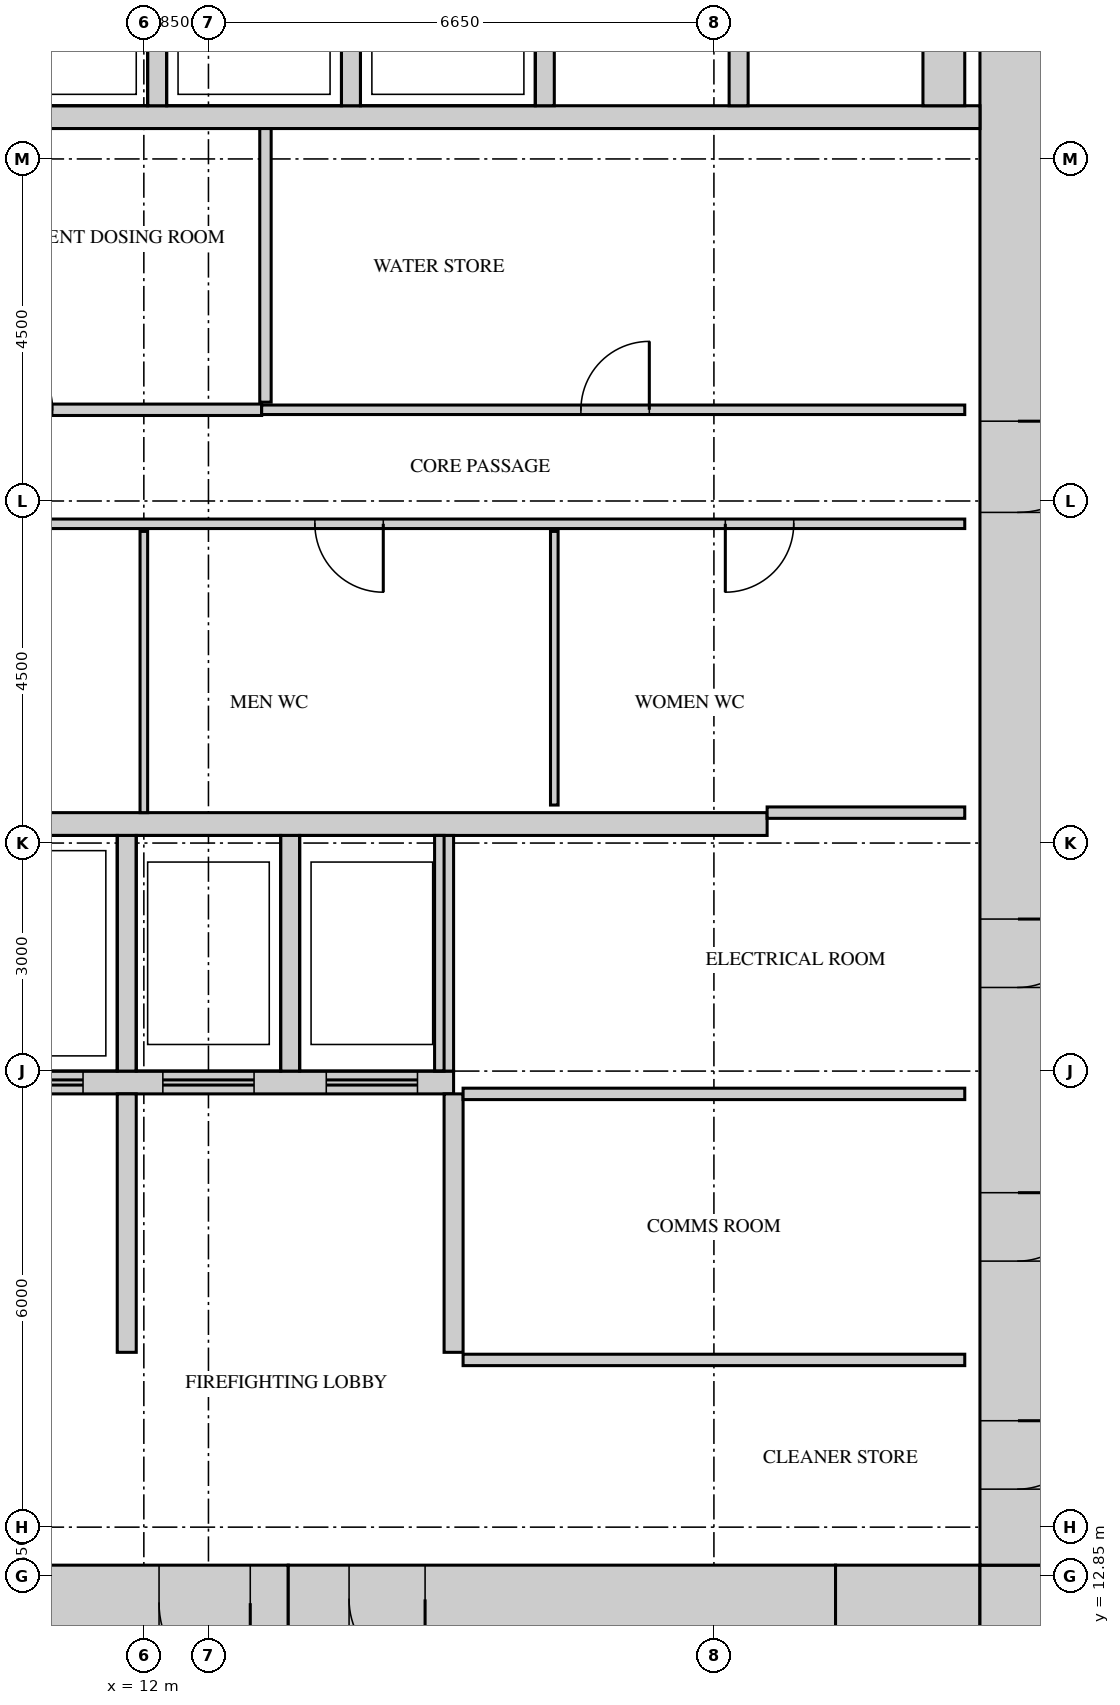
"""IFC4 building model, lengths in metres.
Left out: names, types, materials, properties, quantities, classifications, styles, units other than length and angle.
Written with IfcOpenShell. Run it as: python <this file> out.ifc"""

import sys

from ifc_helpers import new_model, si_unit, direction, frame, frame_2d, origin, place, context, subcontext, project, spatial, rectangle, extrude, source, transform, mapped, element, fill, save


model = new_model("IFC4")
c1 = context("Model", 3, precision=1e-05, world=origin(), true_north=direction((0.0, 1.0)))
c2 = subcontext(c1, "Body", "Model", "MODEL_VIEW")
j1 = project(units=[si_unit("LENGTHUNIT", "METRE"), si_unit("PLANEANGLEUNIT", "RADIAN")], contexts=[c1])
p1 = place(None, origin())
s1 = spatial("IfcSite", under=j1, at=p1, CompositionType="ELEMENT")
p2 = place(p1, origin())
s2 = spatial("IfcBuilding", under=s1, at=p2, CompositionType="ELEMENT")
p3 = place(p2, frame((0.0, 0.0, 105.9)))
s3 = spatial("IfcBuildingStorey", under=s2, at=p3, CompositionType="ELEMENT", Elevation=105.9)
m1 = source(origin(), c2, "Body", "SweptSolid", [
    extrude(rectangle(XDim=6.9, YDim=1.0, at=frame_2d((3.45, 0.0))), origin(), (0.0, 0.0, 1.0), 4.1),
])
p4 = place(p3, frame((7.0, 12.5, 0.0), z_axis=(0.0, 0.0, 1.0), x_axis=(1.0, 0.0, 0.0)))
e1 = element("IfcWall", 1, at=p4, inside=s3, PredefinedType="SHEAR", context=c2, shape_type="MappedRepresentation", body=[
    mapped(m1, transform((0.0, 0.0, 0.0))),
])
m2 = source(origin(), c2, "Body", "SweptSolid", [
    extrude(rectangle(XDim=1.2, YDim=2.1, at=frame_2d((0.6, 1.05))), frame((0.0, 0.51, 0.0), z_axis=(0.0, -1.0, 0.0), x_axis=(1.0, 0.0, 0.0)), (0.0, 0.0, 1.0), 1.02),
])
p5 = place(p4, frame((5.2, 0.0, 0.0)))
e2 = element("IfcOpeningElement", 2, at=p5, cuts=e1, PredefinedType="OPENING", context=c2, shape_type="MappedRepresentation", body=[
    mapped(m2, transform((0.0, 0.0, 0.0))),
])
p6 = place(p4, frame((1.85, 0.0, 0.0)))
e3 = element("IfcOpeningElement", 3, at=p6, cuts=e1, PredefinedType="OPENING", context=c2, shape_type="MappedRepresentation", body=[
    mapped(m2, transform((0.0, 0.0, 0.0))),
])
m3 = source(origin(), c2, "Body", "SweptSolid", [
    extrude(rectangle(XDim=7.2, YDim=0.9, at=frame_2d((3.6, 0.0))), origin(), (0.0, 0.0, 1.0), 4.1),
])
p7 = place(p3, frame((13.9, 12.55, 0.0), z_axis=(0.0, 0.0, 1.0), x_axis=(1.0, 0.0, 0.0)))
e4 = element("IfcWall", 4, at=p7, inside=s3, PredefinedType="SHEAR", context=c2, shape_type="MappedRepresentation", body=[
    mapped(m3, transform((0.0, 0.0, 0.0))),
])
m4 = source(origin(), c2, "Body", "SweptSolid", [
    extrude(rectangle(XDim=1.0, YDim=2.1, at=frame_2d((0.5, 1.05))), frame((0.0, 0.46, 0.0), z_axis=(0.0, -1.0, 0.0), x_axis=(1.0, 0.0, 0.0)), (0.0, 0.0, 1.0), 0.92),
])
p8 = place(p7, frame((0.8, 0.0, 0.0)))
e5 = element("IfcOpeningElement", 5, at=p8, cuts=e4, PredefinedType="OPENING", context=c2, shape_type="MappedRepresentation", body=[
    mapped(m4, transform((0.0, 0.0, 0.0))),
])
m5 = source(origin(), c2, "Body", "SweptSolid", [
    extrude(rectangle(XDim=1.9, YDim=1.0, at=frame_2d((0.95, 0.0))), origin(), (0.0, 0.0, 1.0), 4.1),
])
p9 = place(p3, frame((21.1, 12.5, 0.0), z_axis=(0.0, 0.0, 1.0), x_axis=(1.0, 0.0, 0.0)))
e6 = element("IfcWall", 6, at=p9, inside=s3, PredefinedType="SHEAR", context=c2, shape_type="MappedRepresentation", body=[
    mapped(m5, transform((0.0, 0.0, 0.0))),
])
m6 = source(origin(), c2, "Body", "SweptSolid", [
    extrude(rectangle(XDim=1.0, YDim=1.0, at=frame_2d((0.5, 0.0))), origin(), (0.0, 0.0, 1.0), 4.1),
])
p10 = place(p3, frame((23.0, 12.5, 0.0), z_axis=(0.0, 0.0, 1.0), x_axis=(1.0, 0.0, 0.0)))
e7 = element("IfcWall", 7, at=p10, inside=s3, PredefinedType="SHEAR", context=c2, shape_type="MappedRepresentation", body=[
    mapped(m6, transform((0.0, 0.0, 0.0))),
])
m7 = source(origin(), c2, "Body", "SweptSolid", [
    extrude(rectangle(XDim=28.0, YDim=1.0, at=frame_2d((14.0, 0.0))), origin(), (0.0, 0.0, 1.0), 4.1),
])
p11 = place(p3, frame((23.5, 13.0, 0.0), z_axis=(0.0, 0.0, 1.0), x_axis=(0.0, 1.0, 0.0)))
e8 = element("IfcWall", 8, at=p11, inside=s3, PredefinedType="SHEAR", context=c2, shape_type="MappedRepresentation", body=[
    mapped(m7, transform((0.0, 0.0, 0.0))),
])
m8 = source(origin(), c2, "Body", "SweptSolid", [
    extrude(rectangle(XDim=1.8, YDim=2.1, at=frame_2d((0.9, 1.05))), frame((0.0, 0.51, 0.0), z_axis=(0.0, -1.0, 0.0), x_axis=(1.0, 0.0, 0.0)), (0.0, 0.0, 1.0), 1.02),
])
p12 = place(p11, frame((22.6, 0.0, 0.0)))
e9 = element("IfcOpeningElement", 9, at=p12, cuts=e8, PredefinedType="OPENING", context=c2, shape_type="MappedRepresentation", body=[
    mapped(m8, transform((0.0, 0.0, 0.0))),
])
p13 = place(p11, frame((13.85, 0.0, 0.0)))
e10 = element("IfcOpeningElement", 10, at=p13, cuts=e8, PredefinedType="OPENING", context=c2, shape_type="MappedRepresentation", body=[
    mapped(m2, transform((0.0, 0.0, 0.0))),
])
m9 = source(origin(), c2, "Body", "SweptSolid", [
    extrude(rectangle(XDim=0.9, YDim=2.1, at=frame_2d((0.45, 1.05))), frame((0.0, 0.51, 0.0), z_axis=(0.0, -1.0, 0.0), x_axis=(1.0, 0.0, 0.0)), (0.0, 0.0, 1.0), 1.02),
])
p14 = place(p11, frame((1.0, 0.0, 0.0)))
e11 = element("IfcOpeningElement", 11, at=p14, cuts=e8, PredefinedType="OPENING", context=c2, shape_type="MappedRepresentation", body=[
    mapped(m9, transform((0.0, 0.0, 0.0))),
])
p15 = place(p11, frame((4.0, 0.0, 0.0)))
e12 = element("IfcOpeningElement", 12, at=p15, cuts=e8, PredefinedType="OPENING", context=c2, shape_type="MappedRepresentation", body=[
    mapped(m9, transform((0.0, 0.0, 0.0))),
])
p16 = place(p11, frame((7.6, 0.0, 0.0)))
e13 = element("IfcOpeningElement", 13, at=p16, cuts=e8, PredefinedType="OPENING", context=c2, shape_type="MappedRepresentation", body=[
    mapped(m9, transform((0.0, 0.0, 0.0))),
])
m10 = source(origin(), c2, "Body", "SweptSolid", [
    extrude(rectangle(XDim=13.2, YDim=0.3, at=frame_2d((6.6, 0.0))), origin(), (0.0, 0.0, 1.0), 4.1),
])
p17 = place(p3, frame((7.0, 22.75, 0.0), z_axis=(0.0, 0.0, 1.0), x_axis=(1.0, 0.0, 0.0)))
e14 = element("IfcWall", 14, at=p17, inside=s3, PredefinedType="STANDARD", context=c2, shape_type="MappedRepresentation", body=[
    mapped(m10, transform((0.0, 0.0, 0.0))),
])
m11 = source(origin(), c2, "Body", "SweptSolid", [
    extrude(rectangle(XDim=9.075, YDim=0.3, at=frame_2d((4.538, 0.0))), origin(), (0.0, 0.0, 1.0), 4.1),
])
p18 = place(p3, frame((7.0, 19.35, 0.0), z_axis=(0.0, 0.0, 1.0), x_axis=(1.0, 0.0, 0.0)))
e15 = element("IfcWall", 15, at=p18, inside=s3, PredefinedType="STANDARD", context=c2, shape_type="MappedRepresentation", body=[
    mapped(m11, transform((0.0, 0.0, 0.0))),
])
m12 = source(origin(), c2, "Body", "SweptSolid", [
    extrude(rectangle(XDim=1.2, YDim=2.1, at=frame_2d((0.6, 1.05))), frame((0.0, 0.16, 0.0), z_axis=(0.0, -1.0, 0.0), x_axis=(1.0, 0.0, 0.0)), (0.0, 0.0, 1.0), 0.32),
])
p19 = place(p18, frame((0.65, 0.0, 0.0)))
e16 = element("IfcOpeningElement", 16, at=p19, cuts=e15, PredefinedType="OPENING", context=c2, shape_type="MappedRepresentation", body=[
    mapped(m12, transform((0.0, 0.0, 0.0))),
])
p20 = place(p18, frame((3.0, 0.0, 0.0)))
e17 = element("IfcOpeningElement", 17, at=p20, cuts=e15, PredefinedType="OPENING", context=c2, shape_type="MappedRepresentation", body=[
    mapped(m12, transform((0.0, 0.0, 0.0))),
])
p21 = place(p18, frame((5.25, 0.0, 0.0)))
e18 = element("IfcOpeningElement", 18, at=p21, cuts=e15, PredefinedType="OPENING", context=c2, shape_type="MappedRepresentation", body=[
    mapped(m12, transform((0.0, 0.0, 0.0))),
])
p22 = place(p18, frame((7.4, 0.0, 0.0)))
e19 = element("IfcOpeningElement", 19, at=p22, cuts=e15, PredefinedType="OPENING", context=c2, shape_type="MappedRepresentation", body=[
    mapped(m12, transform((0.0, 0.0, 0.0))),
])
m13 = source(origin(), c2, "Body", "SweptSolid", [
    extrude(rectangle(XDim=16.0, YDim=0.3, at=frame_2d((8.0, 0.0))), origin(), (0.0, 0.0, 1.0), 4.1),
])
p23 = place(p3, frame((7.0, 32.05, 0.0), z_axis=(0.0, 0.0, 1.0), x_axis=(1.0, 0.0, 0.0)))
e20 = element("IfcWall", 20, at=p23, inside=s3, PredefinedType="STANDARD", context=c2, shape_type="MappedRepresentation", body=[
    mapped(m13, transform((0.0, 0.0, 0.0))),
])
m14 = source(origin(), c2, "Body", "SweptSolid", [
    extrude(rectangle(XDim=3.1, YDim=0.25, at=frame_2d((1.55, 0.0))), origin(), (0.0, 0.0, 1.0), 4.1),
])
for number, where, z_axis, x_axis in (
    (21, (11.775, 19.5, 0.0), (0.0, 0.0, 1.0), (0.0, 1.0, 0.0)),
    (22, (13.925, 19.5, 0.0), (0.0, 0.0, 1.0), (0.0, 1.0, 0.0)),
    (23, (15.95, 19.5, 0.0), (0.0, 0.0, 1.0), (0.0, 1.0, 0.0)),
):
    element("IfcWall", number, at=place(p3, frame(where, z_axis=z_axis, x_axis=x_axis)), inside=s3, PredefinedType="STANDARD", context=c2, shape_type="MappedRepresentation", body=[
        mapped(m14, transform((0.0, 0.0, 0.0))),
    ])
m15 = source(origin(), c2, "Body", "SweptSolid", [
    extrude(rectangle(XDim=2.4, YDim=0.25, at=frame_2d((1.2, 0.0))), origin(), (0.0, 0.0, 1.0), 4.1),
])
for number, where, z_axis, x_axis in (
    (24, (12.175, 32.2, 0.0), (0.0, 0.0, 1.0), (0.0, 1.0, 0.0)),
    (25, (14.725, 32.2, 0.0), (0.0, 0.0, 1.0), (0.0, 1.0, 0.0)),
    (26, (17.275, 32.2, 0.0), (0.0, 0.0, 1.0), (0.0, 1.0, 0.0)),
    (27, (19.825, 32.2, 0.0), (0.0, 0.0, 1.0), (0.0, 1.0, 0.0)),
):
    element("IfcWall", number, at=place(p3, frame(where, z_axis=z_axis, x_axis=x_axis)), inside=s3, PredefinedType="STANDARD", context=c2, shape_type="MappedRepresentation", body=[
        mapped(m15, transform((0.0, 0.0, 0.0))),
    ])
m16 = source(origin(), c2, "Body", "SweptSolid", [
    extrude(rectangle(XDim=2.4, YDim=0.55, at=frame_2d((1.2, 0.0))), origin(), (0.0, 0.0, 1.0), 4.1),
])
p24 = place(p3, frame((22.525, 32.2, 0.0), z_axis=(0.0, 0.0, 1.0), x_axis=(0.0, 1.0, 0.0)))
e28 = element("IfcWall", 28, at=p24, inside=s3, PredefinedType="STANDARD", context=c2, shape_type="MappedRepresentation", body=[
    mapped(m16, transform((0.0, 0.0, 0.0))),
])
m17 = source(origin(), c2, "Body", "SweptSolid", [
    extrude(rectangle(XDim=3.4, YDim=0.25, at=frame_2d((1.7, 0.0))), origin(), (0.0, 0.0, 1.0), 4.1),
])
for number, where, z_axis, x_axis in (
    (29, (16.075, 15.8, 0.0), (0.0, 0.0, 1.0), (0.0, 1.0, 0.0)),
    (30, (11.775, 15.8, 0.0), (0.0, 0.0, 1.0), (0.0, 1.0, 0.0)),
):
    element("IfcWall", number, at=place(p3, frame(where, z_axis=z_axis, x_axis=x_axis)), inside=s3, PredefinedType="STANDARD", context=c2, shape_type="MappedRepresentation", body=[
        mapped(m17, transform((0.0, 0.0, 0.0))),
    ])
m18 = source(origin(), c2, "Body", "SweptSolid", [
    extrude(rectangle(XDim=6.6, YDim=0.15, at=frame_2d((3.3, 0.0))), origin(), (0.0, 0.0, 1.0), 4.2),
])
for number, where, z_axis, x_axis in (
    (31, (16.2, 15.7, 0.0), (0.0, 0.0, 1.0), (1.0, 0.0, 0.0)),
    (32, (16.2, 19.2, 0.0), (0.0, 0.0, 1.0), (1.0, 0.0, 0.0)),
):
    element("IfcWall", number, at=place(p3, frame(where, z_axis=z_axis, x_axis=x_axis)), inside=s3, PredefinedType="PARTITIONING", context=c2, shape_type="MappedRepresentation", body=[
        mapped(m18, transform((0.0, 0.0, 0.0))),
    ])
m19 = source(origin(), c2, "Body", "SweptSolid", [
    extrude(rectangle(XDim=3.7, YDim=0.1, at=frame_2d((1.85, 0.0))), origin(), (0.0, 0.0, 1.0), 4.2),
])
p25 = place(p3, frame((12.0, 22.9, 0.0), z_axis=(0.0, 0.0, 1.0), x_axis=(0.0, 1.0, 0.0)))
e33 = element("IfcWall", 33, at=p25, inside=s3, PredefinedType="PARTITIONING", context=c2, shape_type="MappedRepresentation", body=[
    mapped(m19, transform((0.0, 0.0, 0.0))),
])
m20 = source(origin(), c2, "Body", "SweptSolid", [
    extrude(rectangle(XDim=2.6, YDim=0.15, at=frame_2d((1.3, 0.0))), origin(), (0.0, 0.0, 1.0), 4.2),
])
p26 = place(p3, frame((20.2, 22.9, 0.0), z_axis=(0.0, 0.0, 1.0), x_axis=(1.0, 0.0, 0.0)))
e34 = element("IfcWall", 34, at=p26, inside=s3, PredefinedType="PARTITIONING", context=c2, shape_type="MappedRepresentation", body=[
    mapped(m20, transform((0.0, 0.0, 0.0))),
])
m21 = source(origin(), c2, "Body", "SweptSolid", [
    extrude(rectangle(XDim=3.6, YDim=0.1, at=frame_2d((1.8, 0.0))), origin(), (0.0, 0.0, 1.0), 4.2),
])
p27 = place(p3, frame((17.4, 23.0, 0.0), z_axis=(0.0, 0.0, 1.0), x_axis=(0.0, 1.0, 0.0)))
e35 = element("IfcWall", 35, at=p27, inside=s3, PredefinedType="PARTITIONING", context=c2, shape_type="MappedRepresentation", body=[
    mapped(m21, transform((0.0, 0.0, 0.0))),
])
m22 = source(origin(), c2, "Body", "SweptSolid", [
    extrude(rectangle(XDim=15.6, YDim=0.125, at=frame_2d((7.8, 0.0))), origin(), (0.0, 0.0, 1.0), 4.2),
])
p28 = place(p3, frame((7.2, 26.7, 0.0), z_axis=(0.0, 0.0, 1.0), x_axis=(1.0, 0.0, 0.0)))
e36 = element("IfcWall", 36, at=p28, inside=s3, PredefinedType="PARTITIONING", context=c2, shape_type="MappedRepresentation", body=[
    mapped(m22, transform((0.0, 0.0, 0.0))),
])
m23 = source(origin(), c2, "Body", "SweptSolid", [
    extrude(rectangle(XDim=1.0, YDim=2.1, at=frame_2d((0.5, 1.05))), frame((0.0, 0.073, 0.0), z_axis=(0.0, -1.0, 0.0), x_axis=(1.0, 0.0, 0.0)), (0.0, 0.0, 1.0), 0.145),
])
p29 = place(p28, frame((1.9, 0.0, 0.0)))
e37 = element("IfcOpeningElement", 37, at=p29, cuts=e36, PredefinedType="OPENING", context=c2, shape_type="MappedRepresentation", body=[
    mapped(m23, transform((0.0, 0.0, 0.0))),
])
m24 = source(origin(), c2, "Body", "SweptSolid", [
    extrude(rectangle(XDim=0.9, YDim=2.1, at=frame_2d((0.45, 1.05))), frame((0.0, 0.073, 0.0), z_axis=(0.0, -1.0, 0.0), x_axis=(1.0, 0.0, 0.0)), (0.0, 0.0, 1.0), 0.145),
])
p30 = place(p28, frame((7.05, 0.0, 0.0)))
e38 = element("IfcOpeningElement", 38, at=p30, cuts=e36, PredefinedType="OPENING", context=c2, shape_type="MappedRepresentation", body=[
    mapped(m24, transform((0.0, 0.0, 0.0))),
])
p31 = place(p28, frame((12.45, 0.0, 0.0)))
e39 = element("IfcOpeningElement", 39, at=p31, cuts=e36, PredefinedType="OPENING", context=c2, shape_type="MappedRepresentation", body=[
    mapped(m24, transform((0.0, 0.0, 0.0))),
])
m25 = source(origin(), c2, "Body", "SweptSolid", [
    extrude(rectangle(XDim=6.35, YDim=0.15, at=frame_2d((3.175, 0.0))), origin(), (0.0, 0.0, 1.0), 4.2),
])
p32 = place(p3, frame((7.2, 28.2, 0.0), z_axis=(0.0, 0.0, 1.0), x_axis=(1.0, 0.0, 0.0)))
e40 = element("IfcWall", 40, at=p32, inside=s3, PredefinedType="PARTITIONING", context=c2, shape_type="MappedRepresentation", body=[
    mapped(m25, transform((0.0, 0.0, 0.0))),
])
m26 = source(origin(), c2, "Body", "SweptSolid", [
    extrude(rectangle(XDim=0.9, YDim=2.1, at=frame_2d((0.45, 1.05))), frame((0.0, 0.085, 0.0), z_axis=(0.0, -1.0, 0.0), x_axis=(1.0, 0.0, 0.0)), (0.0, 0.0, 1.0), 0.17),
])
p33 = place(p32, frame((2.7, 0.0, 0.0)))
e41 = element("IfcOpeningElement", 41, at=p33, cuts=e40, PredefinedType="OPENING", context=c2, shape_type="MappedRepresentation", body=[
    mapped(m26, transform((0.0, 0.0, 0.0))),
])
m27 = source(origin(), c2, "Body", "SweptSolid", [
    extrude(rectangle(XDim=9.25, YDim=0.125, at=frame_2d((4.625, 0.0))), origin(), (0.0, 0.0, 1.0), 4.2),
])
p34 = place(p3, frame((13.55, 28.2, 0.0), z_axis=(0.0, 0.0, 1.0), x_axis=(1.0, 0.0, 0.0)))
e42 = element("IfcWall", 42, at=p34, inside=s3, PredefinedType="PARTITIONING", context=c2, shape_type="MappedRepresentation", body=[
    mapped(m27, transform((0.0, 0.0, 0.0))),
])
p35 = place(p34, frame((4.2, 0.0, 0.0)))
e43 = element("IfcOpeningElement", 43, at=p35, cuts=e42, PredefinedType="OPENING", context=c2, shape_type="MappedRepresentation", body=[
    mapped(m24, transform((0.0, 0.0, 0.0))),
])
m28 = source(origin(), c2, "Body", "SweptSolid", [
    extrude(rectangle(XDim=3.6, YDim=0.15, at=frame_2d((1.8, 0.0))), origin(), (0.0, 0.0, 1.0), 4.2),
])
p36 = place(p3, frame((13.6, 28.3, 0.0), z_axis=(0.0, 0.0, 1.0), x_axis=(0.0, 1.0, 0.0)))
e44 = element("IfcWall", 44, at=p36, inside=s3, PredefinedType="PARTITIONING", context=c2, shape_type="MappedRepresentation", body=[
    mapped(m28, transform((0.0, 0.0, 0.0))),
])
m29 = source(origin(), c2, "Body", "SweptSolid", [
    extrude(rectangle(XDim=1.2, YDim=2.1, at=frame_2d((0.6, 1.05))), frame((0.0, 0.45, 0.0), z_axis=(0.0, -1.0, 0.0), x_axis=(1.0, 0.0, 0.0)), (0.0, 0.0, 1.0), 0.9),
])
p37 = place(p13, origin())
e45 = element("IfcDoor", 45, at=p37, inside=s3, OperationType="SINGLE_SWING_RIGHT", PredefinedType="DOOR", context=c2, shape_type="MappedRepresentation", body=[
    mapped(m29, transform((0.0, 0.0, 0.0))),
])
fill(e10, e45)
m30 = source(origin(), c2, "Body", "SweptSolid", [
    extrude(rectangle(XDim=0.9, YDim=2.1, at=frame_2d((0.45, 1.05))), frame((0.0, 0.025, 0.0), z_axis=(0.0, -1.0, 0.0), x_axis=(1.0, 0.0, 0.0)), (0.0, 0.0, 1.0), 0.05),
])
p38 = place(p35, origin())
e46 = element("IfcDoor", 46, at=p38, inside=s3, OperationType="SINGLE_SWING_LEFT", PredefinedType="DOOR", context=c2, shape_type="MappedRepresentation", body=[
    mapped(m30, transform((0.0, 0.0, 0.0))),
])
fill(e43, e46)
p39 = place(p30, origin())
e47 = element("IfcDoor", 47, at=p39, inside=s3, OperationType="SINGLE_SWING_RIGHT", PredefinedType="DOOR", context=c2, shape_type="MappedRepresentation", body=[
    mapped(m30, transform((0.0, 0.0, 0.0))),
])
fill(e38, e47)
p40 = place(p31, origin())
e48 = element("IfcDoor", 48, at=p40, inside=s3, OperationType="SINGLE_SWING_LEFT", PredefinedType="DOOR", context=c2, shape_type="MappedRepresentation", body=[
    mapped(m30, transform((0.0, 0.0, 0.0))),
])
fill(e39, e48)
m31 = source(origin(), c2, "Body", "SweptSolid", [
    extrude(rectangle(XDim=0.9, YDim=2.1, at=frame_2d((0.45, 1.05))), frame((0.0, 0.45, 0.0), z_axis=(0.0, -1.0, 0.0), x_axis=(1.0, 0.0, 0.0)), (0.0, 0.0, 1.0), 0.9),
])
p41 = place(p14, origin())
e49 = element("IfcDoor", 49, at=p41, inside=s3, OperationType="SINGLE_SWING_RIGHT", PredefinedType="DOOR", context=c2, shape_type="MappedRepresentation", body=[
    mapped(m31, transform((0.0, 0.0, 0.0))),
])
fill(e11, e49)
p42 = place(p15, origin())
e50 = element("IfcDoor", 50, at=p42, inside=s3, OperationType="SINGLE_SWING_RIGHT", PredefinedType="DOOR", context=c2, shape_type="MappedRepresentation", body=[
    mapped(m31, transform((0.0, 0.0, 0.0))),
])
fill(e12, e50)
p43 = place(p16, origin())
e51 = element("IfcDoor", 51, at=p43, inside=s3, OperationType="SINGLE_SWING_RIGHT", PredefinedType="DOOR", context=c2, shape_type="MappedRepresentation", body=[
    mapped(m31, transform((0.0, 0.0, 0.0))),
])
fill(e13, e51)
p44 = place(p5, origin())
e52 = element("IfcDoor", 52, at=p44, inside=s3, OperationType="SINGLE_SWING_RIGHT", PredefinedType="DOOR", context=c2, shape_type="MappedRepresentation", body=[
    mapped(m29, transform((0.0, 0.0, 0.0))),
])
fill(e2, e52)
m32 = source(origin(), c2, "Body", "SweptSolid", [
    extrude(rectangle(XDim=1.0, YDim=2.1, at=frame_2d((0.5, 1.05))), frame((0.0, 0.4, 0.0), z_axis=(0.0, -1.0, 0.0), x_axis=(1.0, 0.0, 0.0)), (0.0, 0.0, 1.0), 0.8),
])
p45 = place(p8, origin())
e53 = element("IfcDoor", 53, at=p45, inside=s3, OperationType="SINGLE_SWING_RIGHT", PredefinedType="DOOR", context=c2, shape_type="MappedRepresentation", body=[
    mapped(m32, transform((0.0, 0.0, 0.0))),
])
fill(e5, e53)
m33 = source(origin(), c2, "Body", "SweptSolid", [
    extrude(rectangle(XDim=1.2, YDim=2.1, at=frame_2d((0.6, 1.05))), frame((0.0, 0.025, 0.0), z_axis=(0.0, -1.0, 0.0), x_axis=(1.0, 0.0, 0.0)), (0.0, 0.0, 1.0), 0.05),
])
p46 = place(p20, origin())
e54 = element("IfcDoor", 54, at=p46, inside=s3, OperationType="DOUBLE_DOOR_SLIDING", PredefinedType="DOOR", context=c2, shape_type="MappedRepresentation", body=[
    mapped(m33, transform((0.0, 0.0, 0.0))),
])
fill(e17, e54)
p47 = place(p21, origin())
e55 = element("IfcDoor", 55, at=p47, inside=s3, OperationType="DOUBLE_DOOR_SLIDING", PredefinedType="DOOR", context=c2, shape_type="MappedRepresentation", body=[
    mapped(m33, transform((0.0, 0.0, 0.0))),
])
fill(e18, e55)
p48 = place(p22, origin())
e56 = element("IfcDoor", 56, at=p48, inside=s3, OperationType="DOUBLE_DOOR_SLIDING", PredefinedType="DOOR", context=c2, shape_type="MappedRepresentation", body=[
    mapped(m33, transform((0.0, 0.0, 0.0))),
])
fill(e19, e56)
save(model, sys.argv[1])
